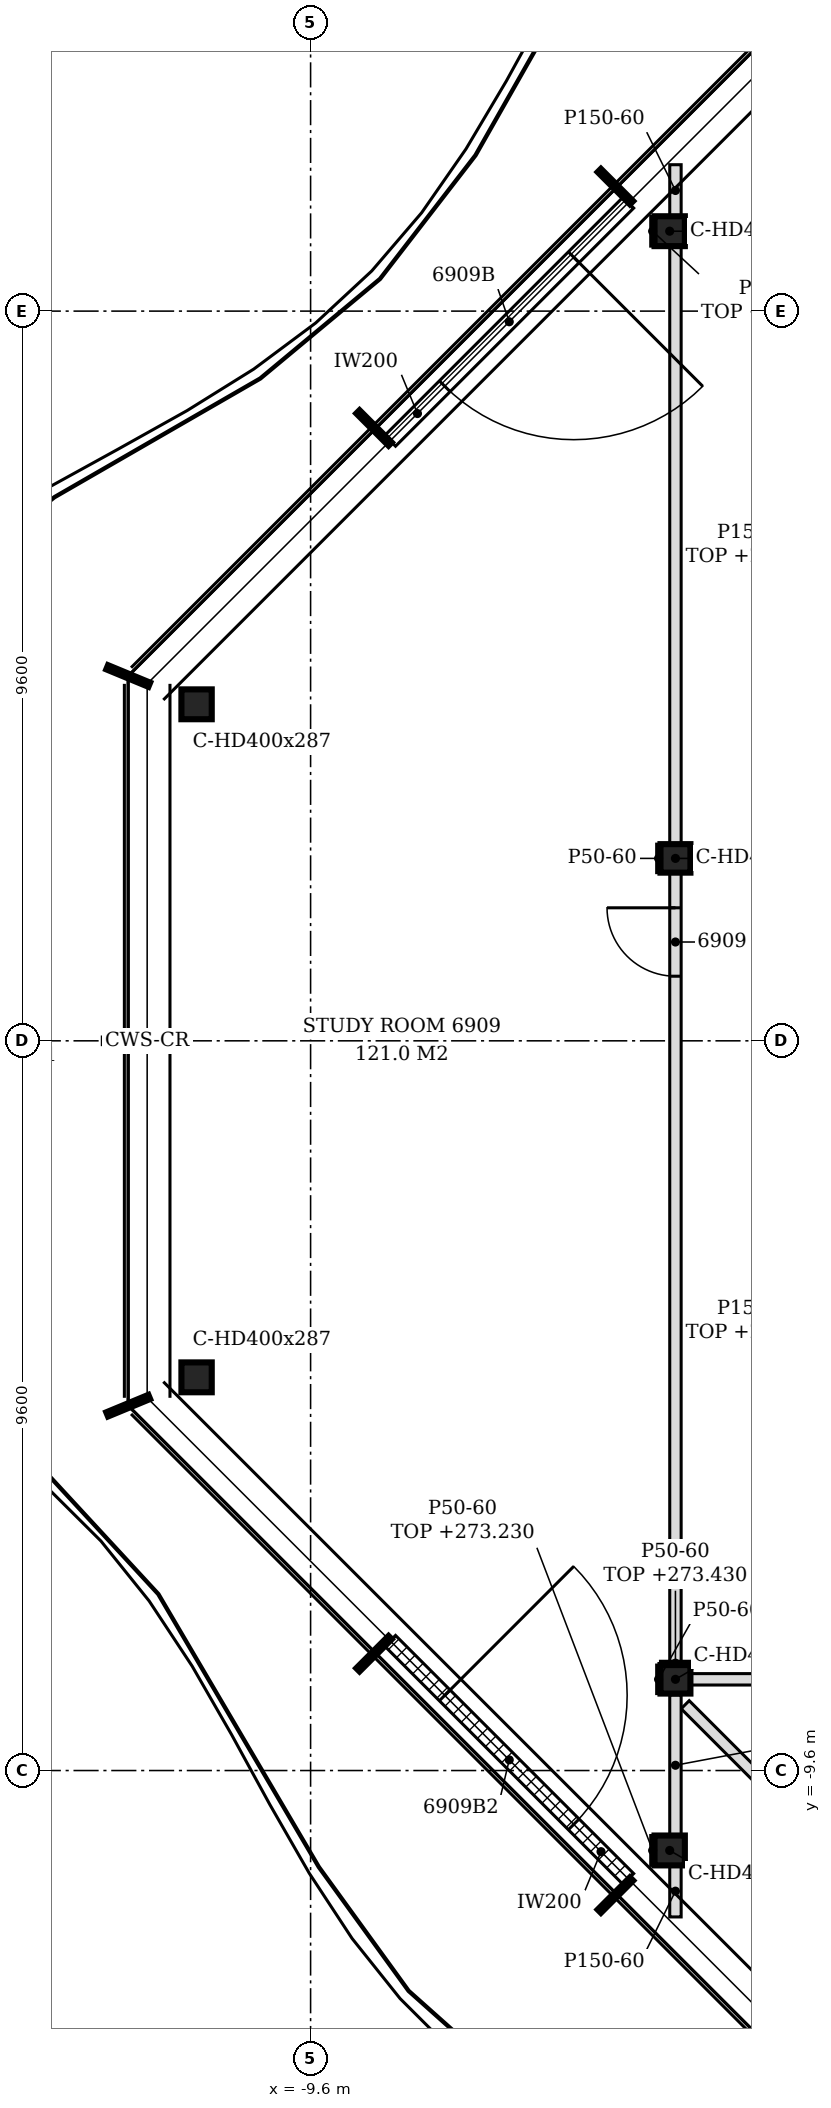
"""IFC4 building model, lengths in metres.
Left out: names, types, materials, properties, quantities, classifications, styles, units other than length and angle.
Written with IfcOpenShell. Run it as: python <this file> out.ifc"""

import sys

from ifc_helpers import new_model, si_unit, direction, frame, frame_2d, origin, origin_2d, place, context, subcontext, project, spatial, polyline, rectangle, i_section, outline, extrude, element, fill, save


model = new_model("IFC4")
c1 = context("Model", 3, precision=1e-05, world=origin(), true_north=direction((0.0, 1.0)))
c2 = subcontext(c1, "Body", "Model", "MODEL_VIEW")
j1 = project(units=[si_unit("LENGTHUNIT", "METRE"), si_unit("PLANEANGLEUNIT", "RADIAN")], contexts=[c1])
p1 = place(None, origin())
s1 = spatial("IfcSite", under=j1, at=p1, CompositionType="ELEMENT")
p2 = place(p1, origin())
s2 = spatial("IfcBuilding", under=s1, at=p2, CompositionType="ELEMENT")
p3 = place(p2, frame((0.0, 0.0, 270.6)))
s3 = spatial("IfcBuildingStorey", under=s2, at=p3, CompositionType="ELEMENT", Elevation=270.6)
for number, where, z_axis, x_axis in (
    (1, (-4.876, 10.652, -0.15), (0.0, 0.0, 1.0), (1.0, 0.0, 0.0)),
    (2, (-11.1, 4.427, -0.15), (0.0, 0.0, 1.0), (1.0, 0.0, 0.0)),
    (3, (-11.1, -4.427, -0.15), (0.0, 0.0, 1.0), (1.0, 0.0, 0.0)),
    (4, (-4.876, -10.652, -0.15), (0.0, 0.0, 1.0), (1.0, 0.0, 0.0)),
):
    element("IfcColumn", number, at=place(p3, frame(where, z_axis=z_axis, x_axis=x_axis)), inside=s3, PredefinedType="COLUMN", context=c2, shape_type="SweptSolid", body=[
        extrude(i_section(OverallWidth=0.399, OverallDepth=0.393, WebThickness=0.023, FlangeThickness=0.037, FilletRadius=0.015, at=origin_2d()), origin(), (0.0, 0.0, 1.0), 3.6),
    ])
for number, where, z_axis, x_axis in (
    (5, (-4.8, -8.4, -0.15), (0.0, 0.0, 1.0), (1.0, 0.0, 0.0)),
    (6, (-4.8, 2.4, -0.15), (0.0, 0.0, 1.0), (1.0, 0.0, 0.0)),
):
    element("IfcColumn", number, at=place(p3, frame(where, z_axis=z_axis, x_axis=x_axis)), inside=s3, PredefinedType="COLUMN", context=c2, shape_type="SweptSolid", body=[
        extrude(i_section(OverallWidth=0.394, OverallDepth=0.375, WebThickness=0.017, FlangeThickness=0.028, FilletRadius=0.015, at=origin_2d()), origin(), (0.0, 0.0, 1.0), 3.6),
    ])
p4 = place(p3, frame((-5.42, 11.026, 0.0), z_axis=(0.0, 0.0, 1.0), x_axis=(-0.707134329907, -0.707079231393, 0.0)))
e7 = element("IfcWall", 7, at=p4, inside=s3, PredefinedType="NOTDEFINED", context=c2, shape_type="SweptSolid", body=[
    extrude(rectangle(XDim=4.431, YDim=0.2, at=frame_2d((2.215, 0.0))), origin(), (0.0, 0.0, 1.0), 3.45),
])
p5 = place(p4, frame((1.015, 0.0, 0.0)))
e8 = element("IfcOpeningElement", 8, at=p5, cuts=e7, PredefinedType="OPENING", context=c2, shape_type="SweptSolid", body=[
    extrude(rectangle(XDim=2.4, YDim=2.4, at=frame_2d((1.2, 1.2))), frame((0.0, 0.11, 0.0), z_axis=(0.0, -1.0, 0.0), x_axis=(1.0, 0.0, 0.0)), (0.0, 0.0, 1.0), 0.22),
])
p6 = place(p3, frame((-8.553, -7.893, 0.0), z_axis=(0.0, 0.0, 1.0), x_axis=(0.707134329907, -0.707079231393, 0.0)))
e9 = element("IfcWall", 9, at=p6, inside=s3, PredefinedType="NOTDEFINED", context=c2, shape_type="SweptSolid", body=[
    extrude(rectangle(XDim=4.431, YDim=0.2, at=frame_2d((2.215, 0.0))), origin(), (0.0, 0.0, 1.0), 3.45),
])
p7 = place(p6, frame((1.015, 0.0, 0.0)))
e10 = element("IfcOpeningElement", 10, at=p7, cuts=e9, PredefinedType="OPENING", context=c2, shape_type="SweptSolid", body=[
    extrude(rectangle(XDim=2.4, YDim=2.4, at=frame_2d((1.2, 1.2))), frame((0.0, 0.11, 0.0), z_axis=(0.0, -1.0, 0.0), x_axis=(1.0, 0.0, 0.0)), (0.0, 0.0, 1.0), 0.22),
])
p8 = place(p3, frame((-0.128, -13.278, 0.0), z_axis=(0.0, 0.0, 1.0), x_axis=(-0.707106781187, 0.707106781187, 0.0)))
e11 = element("IfcWall", 11, at=p8, inside=s3, PredefinedType="PARTITIONING", context=c2, shape_type="SweptSolid", body=[
    extrude(rectangle(XDim=6.427, YDim=0.15, at=frame_2d((3.213, 0.0))), origin(), (0.0, 0.0, 1.0), 3.03),
])
p9 = place(p3, frame((-4.8, -11.526, 0.0), z_axis=(0.0, 0.0, 1.0), x_axis=(0.0, 1.0, 0.0)))
e12 = element("IfcWall", 12, at=p9, inside=s3, PredefinedType="PARTITIONING", context=c2, shape_type="SweptSolid", body=[
    extrude(outline(polyline([(0.0, 0.0), (0.678, 0.0), (0.678, 2.63), (0.229, 2.63), (0.227, 3.45), (0.0, 3.45), (0.0, 0.0)])), frame((0.0, 0.075, 0.0), z_axis=(0.0, -1.0, 0.0), x_axis=(1.0, 0.0, 0.0)), (0.0, 0.0, 1.0), 0.15),
])
p10 = place(p3, frame((-4.8, -10.455, 0.0), z_axis=(0.0, 0.0, 1.0), x_axis=(0.0, 1.0, 0.0)))
e13 = element("IfcWall", 13, at=p10, inside=s3, PredefinedType="PARTITIONING", context=c2, shape_type="SweptSolid", body=[
    extrude(outline(polyline([(0.0, 0.0), (1.849, 0.0), (1.849, 3.03), (0.298, 3.03), (0.296, 2.63), (0.058, 2.63), (0.056, 3.03), (0.0, 3.03), (0.0, 0.0)])), frame((0.0, 0.075, 0.0), z_axis=(0.0, -1.0, 0.0), x_axis=(1.0, 0.0, 0.0)), (0.0, 0.0, 1.0), 0.15),
])
p11 = place(p3, frame((-4.603, -8.4, 0.0), z_axis=(0.0, 0.0, 1.0), x_axis=(1.0, 0.0, 0.0)))
e14 = element("IfcWall", 14, at=p11, inside=s3, PredefinedType="PARTITIONING", context=c2, shape_type="SweptSolid", body=[
    extrude(rectangle(XDim=4.678, YDim=0.15, at=frame_2d((2.339, 0.0))), origin(), (0.0, 0.0, 1.0), 2.83),
])
p12 = place(p3, frame((-4.8, -8.212, 0.0), z_axis=(0.0, 0.0, 1.0), x_axis=(0.0, 1.0, 0.0)))
e15 = element("IfcWall", 15, at=p12, inside=s3, PredefinedType="PARTITIONING", context=c2, shape_type="SweptSolid", body=[
    extrude(rectangle(XDim=10.425, YDim=0.15, at=frame_2d((5.212, 0.0))), origin(), (0.0, 0.0, 1.0), 2.83),
])
p13 = place(p12, frame((9.062, 0.0, 0.0)))
e16 = element("IfcOpeningElement", 16, at=p13, cuts=e15, PredefinedType="OPENING", context=c2, shape_type="SweptSolid", body=[
    extrude(rectangle(XDim=0.9, YDim=2.1, at=frame_2d((0.45, 1.05))), frame((0.0, 0.085, 0.0), z_axis=(0.0, -1.0, 0.0), x_axis=(1.0, 0.0, 0.0)), (0.0, 0.0, 1.0), 0.17),
])
p14 = place(p3, frame((-4.8, 2.587, 0.0), z_axis=(0.0, 0.0, 1.0), x_axis=(0.0, 1.0, 0.0)))
e17 = element("IfcWall", 17, at=p14, inside=s3, PredefinedType="PARTITIONING", context=c2, shape_type="SweptSolid", body=[
    extrude(outline(polyline([(0.0, 0.0), (7.868, 0.0), (7.867, 2.93), (7.809, 2.93), (7.807, 2.63), (7.57, 2.63), (7.568, 2.93), (0.0, 2.93), (0.0, 0.0)])), frame((0.0, 0.075, 0.0), z_axis=(0.0, -1.0, 0.0), x_axis=(1.0, 0.0, 0.0)), (0.0, 0.0, 1.0), 0.15),
])
p15 = place(p3, frame((-4.8, 10.848, 0.0), z_axis=(0.0, 0.0, 1.0), x_axis=(0.0, 1.0, 0.0)))
e18 = element("IfcWall", 18, at=p15, inside=s3, PredefinedType="PARTITIONING", context=c2, shape_type="SweptSolid", body=[
    extrude(outline(polyline([(0.0, 0.0), (0.678, 0.0), (0.678, 3.45), (0.449, 3.45), (0.447, 2.63), (0.0, 2.63), (0.0, 0.0)])), frame((0.0, 0.075, 0.0), z_axis=(0.0, -1.0, 0.0), x_axis=(1.0, 0.0, 0.0)), (0.0, 0.0, 1.0), 0.15),
])
p16 = place(p3, frame((-5.1, -10.848, 0.0), z_axis=(0.0, 0.0, 1.0), x_axis=(0.0, 1.0, 0.0)))
e19 = element("IfcWall", 19, at=p16, inside=s3, PredefinedType="PARTITIONING", context=c2, shape_type="SweptSolid", body=[
    extrude(rectangle(XDim=0.393, YDim=0.05, at=frame_2d((0.196, 0.0))), origin(), (0.0, 0.0, 1.0), 2.63),
])
for number, where, z_axis, x_axis in (
    (20, (-5.022, -8.587, 0.0), (0.0, 0.0, 1.0), (0.0, 1.0, 0.0)),
    (21, (-5.022, 2.212, 0.0), (0.0, 0.0, 1.0), (0.0, 1.0, 0.0)),
):
    element("IfcWall", number, at=place(p3, frame(where, z_axis=z_axis, x_axis=x_axis)), inside=s3, PredefinedType="PARTITIONING", context=c2, shape_type="SweptSolid", body=[
        extrude(rectangle(XDim=0.375, YDim=0.05, at=frame_2d((0.188, 0.0))), origin(), (0.0, 0.0, 1.0), 3.45),
    ])
p17 = place(p3, frame((-5.1, 10.455, 0.0), z_axis=(0.0, 0.0, 1.0), x_axis=(0.0, 1.0, 0.0)))
e22 = element("IfcWall", 22, at=p17, inside=s3, PredefinedType="PARTITIONING", context=c2, shape_type="SweptSolid", body=[
    extrude(rectangle(XDim=0.393, YDim=0.05, at=frame_2d((0.196, 0.0))), origin(), (0.0, 0.0, 1.0), 2.63),
])
p18 = place(p3, frame((-4.997, -8.188, 0.0), z_axis=(0.0, 0.0, 1.0), x_axis=(1.0, 0.0, 0.0)))
e23 = element("IfcWall", 23, at=p18, inside=s3, PredefinedType="PARTITIONING", context=c2, shape_type="SweptSolid", body=[
    extrude(rectangle(XDim=0.394, YDim=0.05, at=frame_2d((0.197, 0.0))), origin(), (0.0, 0.0, 1.0), 2.83),
])
p19 = place(p5, origin())
e24 = element("IfcDoor", 24, at=p19, inside=s3, OperationType="SINGLE_SWING_LEFT", PredefinedType="DOOR", context=c2, shape_type="SweptSolid", body=[
    extrude(rectangle(XDim=2.4, YDim=2.4, at=frame_2d((1.2, 1.2))), frame((0.0, 0.025, 0.0), z_axis=(0.0, -1.0, 0.0), x_axis=(1.0, 0.0, 0.0)), (0.0, 0.0, 1.0), 0.05),
])
fill(e8, e24)
p20 = place(p7, origin())
e25 = element("IfcDoor", 25, at=p20, inside=s3, OperationType="SINGLE_SWING_LEFT", PredefinedType="DOOR", context=c2, shape_type="SweptSolid", body=[
    extrude(rectangle(XDim=2.4, YDim=2.4, at=frame_2d((1.2, 1.2))), frame((0.0, 0.025, 0.0), z_axis=(0.0, -1.0, 0.0), x_axis=(1.0, 0.0, 0.0)), (0.0, 0.0, 1.0), 0.05),
])
fill(e10, e25)
p21 = place(p13, origin())
e26 = element("IfcDoor", 26, at=p21, inside=s3, OperationType="SINGLE_SWING_RIGHT", PredefinedType="DOOR", context=c2, shape_type="SweptSolid", body=[
    extrude(rectangle(XDim=0.9, YDim=2.1, at=frame_2d((0.45, 1.05))), frame((0.0, 0.025, 0.0), z_axis=(0.0, -1.0, 0.0), x_axis=(1.0, 0.0, 0.0)), (0.0, 0.0, 1.0), 0.05),
])
fill(e16, e26)
save(model, sys.argv[1])
